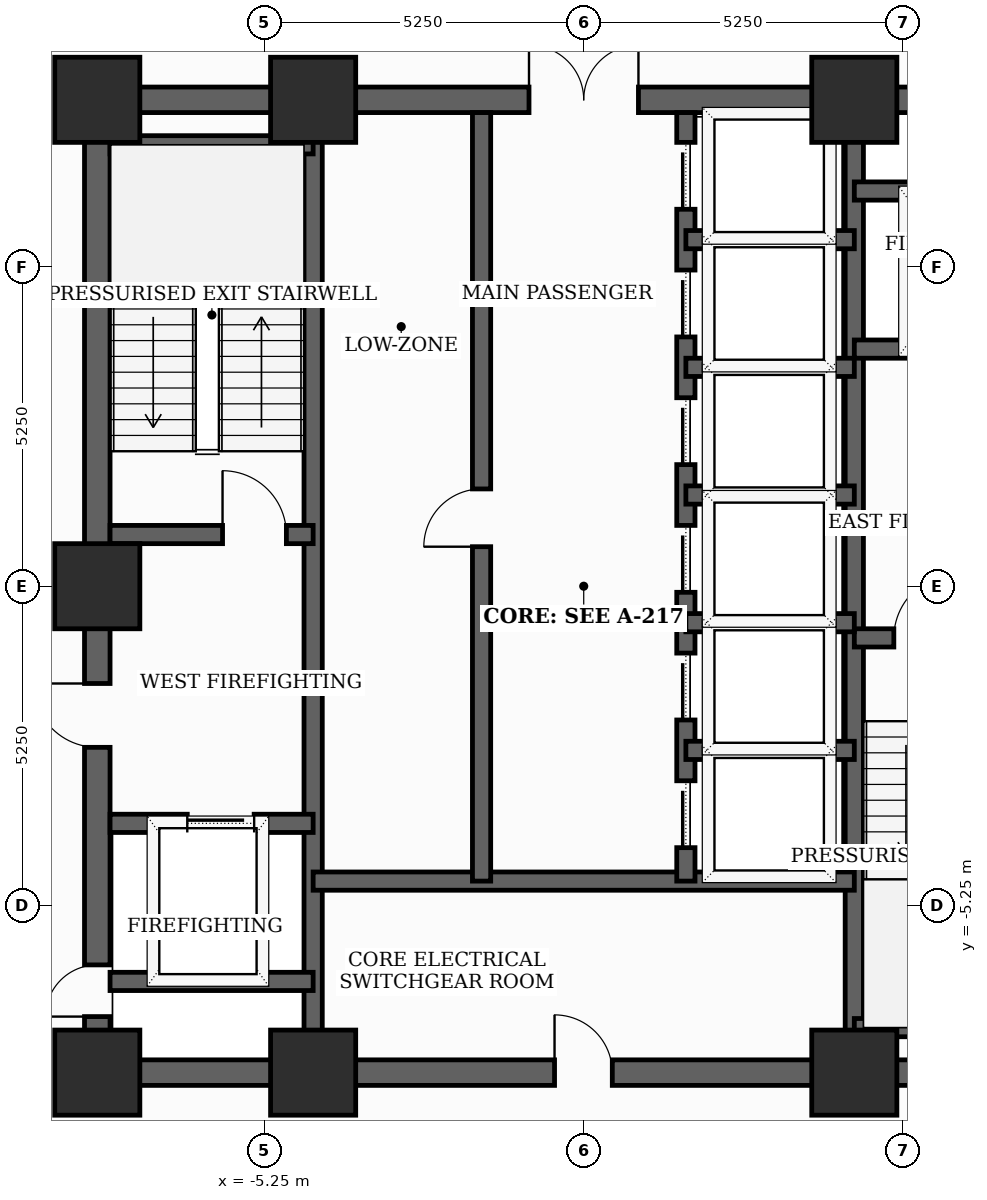
"""IFC4 building model, lengths in metres.
Left out: names, types, materials, properties, quantities, classifications, styles, units other than length and angle.
Written with IfcOpenShell. Run it as: python <this file> out.ifc"""

import sys

from ifc_helpers import new_model, si_unit, direction, frame, frame_2d, origin, origin_2d, place, context, subcontext, project, spatial, rectangle, extrude, element, fill, save


model = new_model("IFC4")
c1 = context("Model", 3, precision=1e-05, world=origin(), true_north=direction((0.0, 1.0)))
c2 = subcontext(c1, "Body", "Model", "MODEL_VIEW")
j1 = project(units=[si_unit("LENGTHUNIT", "METRE"), si_unit("PLANEANGLEUNIT", "RADIAN")], contexts=[c1])
p1 = place(None, origin())
s1 = spatial("IfcSite", under=j1, at=p1, CompositionType="ELEMENT")
p2 = place(p1, origin())
s2 = spatial("IfcBuilding", under=s1, at=p2, CompositionType="ELEMENT")
p3 = place(p2, frame((0.0, 0.0, 119.9)))
s3 = spatial("IfcBuildingStorey", under=s2, at=p3, CompositionType="ELEMENT", Elevation=119.9)
for number, where, z_axis, x_axis in (
    (1, (-8.0, -8.0, 0.0), (0.0, 0.0, 1.0), (1.0, 0.0, 0.0)),
    (2, (-4.45, -8.0, 0.0), (0.0, 0.0, 1.0), (1.0, 0.0, 0.0)),
    (3, (4.45, -8.0, 0.0), (0.0, 0.0, 1.0), (1.0, 0.0, 0.0)),
    (4, (4.45, 8.0, 0.0), (0.0, 0.0, 1.0), (1.0, 0.0, 0.0)),
    (5, (-4.45, 8.0, 0.0), (0.0, 0.0, 1.0), (1.0, 0.0, 0.0)),
    (6, (-8.0, 8.0, 0.0), (0.0, 0.0, 1.0), (1.0, 0.0, 0.0)),
    (7, (-8.0, 0.0, 0.0), (0.0, 0.0, 1.0), (1.0, 0.0, 0.0)),
):
    element("IfcColumn", number, at=place(p3, frame(where, z_axis=z_axis, x_axis=x_axis)), inside=s3, PredefinedType="COLUMN", context=c2, shape_type="SweptSolid", body=[
        extrude(rectangle(XDim=1.4, YDim=1.4, at=origin_2d()), origin(), (0.0, 0.0, 1.0), 3.7),
    ])
p4 = place(p3, frame((-8.0, -8.0, 0.0), z_axis=(0.0, 0.0, 1.0), x_axis=(0.0, 1.0, 0.0)))
e8 = element("IfcWall", 8, at=p4, inside=s3, PredefinedType="SHEAR", context=c2, shape_type="SweptSolid", body=[
    extrude(rectangle(XDim=16.0, YDim=0.42, at=frame_2d((8.0, 0.0))), origin(), (0.0, 0.0, 1.0), 3.5),
])
p5 = place(p4, frame((0.922, 0.0, 0.0)))
e9 = element("IfcOpeningElement", 9, at=p5, cuts=e8, PredefinedType="OPENING", context=c2, shape_type="SweptSolid", body=[
    extrude(rectangle(XDim=0.85, YDim=2.02, at=frame_2d((0.425, 1.01))), frame((0.0, 0.22, 0.0), z_axis=(0.0, -1.0, 0.0), x_axis=(1.0, 0.0, 0.0)), (0.0, 0.0, 1.0), 0.44),
])
p6 = place(p4, frame((5.35, 0.0, 0.0)))
e10 = element("IfcOpeningElement", 10, at=p6, cuts=e8, PredefinedType="OPENING", context=c2, shape_type="SweptSolid", body=[
    extrude(rectangle(XDim=1.05, YDim=2.15, at=frame_2d((0.525, 1.075))), frame((0.0, 0.22, 0.0), z_axis=(0.0, -1.0, 0.0), x_axis=(1.0, 0.0, 0.0)), (0.0, 0.0, 1.0), 0.44),
])
p7 = place(p3, frame((-8.0, -8.0, 0.0), z_axis=(0.0, 0.0, 1.0), x_axis=(1.0, 0.0, 0.0)))
e11 = element("IfcWall", 11, at=p7, inside=s3, PredefinedType="SHEAR", context=c2, shape_type="SweptSolid", body=[
    extrude(rectangle(XDim=16.0, YDim=0.42, at=frame_2d((8.0, 0.0))), origin(), (0.0, 0.0, 1.0), 3.5),
])
p8 = place(p7, frame((7.52, 0.0, 0.0)))
e12 = element("IfcOpeningElement", 12, at=p8, cuts=e11, PredefinedType="OPENING", context=c2, shape_type="SweptSolid", body=[
    extrude(rectangle(XDim=0.95, YDim=2.1, at=frame_2d((0.475, 1.05))), frame((0.0, 0.22, 0.0), z_axis=(0.0, -1.0, 0.0), x_axis=(1.0, 0.0, 0.0)), (0.0, 0.0, 1.0), 0.44),
])
p9 = place(p3, frame((-8.0, 8.0, 0.0), z_axis=(0.0, 0.0, 1.0), x_axis=(1.0, 0.0, 0.0)))
e13 = element("IfcWall", 13, at=p9, inside=s3, PredefinedType="SHEAR", context=c2, shape_type="SweptSolid", body=[
    extrude(rectangle(XDim=16.0, YDim=0.42, at=frame_2d((8.0, 0.0))), origin(), (0.0, 0.0, 1.0), 3.5),
])
p10 = place(p9, frame((7.1, 0.0, 0.0)))
e14 = element("IfcOpeningElement", 14, at=p10, cuts=e13, PredefinedType="OPENING", context=c2, shape_type="SweptSolid", body=[
    extrude(rectangle(XDim=1.8, YDim=2.15, at=frame_2d((0.9, 1.075))), frame((0.0, 0.22, 0.0), z_axis=(0.0, -1.0, 0.0), x_axis=(1.0, 0.0, 0.0)), (0.0, 0.0, 1.0), 0.44),
])
for number, where, z_axis, x_axis in (
    (15, (-4.45, -7.79, 0.0), (0.0, 0.0, 1.0), (0.0, 1.0, 0.0)),
    (16, (4.45, -7.79, 0.0), (0.0, 0.0, 1.0), (0.0, 1.0, 0.0)),
):
    element("IfcWall", number, at=place(p3, frame(where, z_axis=z_axis, x_axis=x_axis)), inside=s3, PredefinedType="SHEAR", context=c2, shape_type="SweptSolid", body=[
        extrude(rectangle(XDim=15.58, YDim=0.3, at=frame_2d((7.79, 0.0))), origin(), (0.0, 0.0, 1.0), 3.5),
    ])
p11 = place(p3, frame((-7.79, 0.85, 0.0), z_axis=(0.0, 0.0, 1.0), x_axis=(1.0, 0.0, 0.0)))
e17 = element("IfcWall", 17, at=p11, inside=s3, PredefinedType="SHEAR", context=c2, shape_type="SweptSolid", body=[
    extrude(rectangle(XDim=3.34, YDim=0.3, at=frame_2d((1.67, 0.0))), origin(), (0.0, 0.0, 1.0), 3.5),
])
p12 = place(p11, frame((1.85, 0.0, 0.0)))
e18 = element("IfcOpeningElement", 18, at=p12, cuts=e17, PredefinedType="OPENING", context=c2, shape_type="SweptSolid", body=[
    extrude(rectangle(XDim=1.05, YDim=2.15, at=frame_2d((0.525, 1.075))), frame((0.0, 0.16, 0.0), z_axis=(0.0, -1.0, 0.0), x_axis=(1.0, 0.0, 0.0)), (0.0, 0.0, 1.0), 0.32),
])
p13 = place(p3, frame((-7.79, 7.26, 0.0), z_axis=(0.0, 0.0, 1.0), x_axis=(1.0, 0.0, 0.0)))
e19 = element("IfcWall", 19, at=p13, inside=s3, PredefinedType="SHEAR", context=c2, shape_type="SweptSolid", body=[
    extrude(rectangle(XDim=3.34, YDim=0.3, at=frame_2d((1.67, 0.0))), origin(), (0.0, 0.0, 1.0), 3.5),
])
p14 = place(p3, frame((4.45, -0.85, 0.0), z_axis=(0.0, 0.0, 1.0), x_axis=(1.0, 0.0, 0.0)))
e20 = element("IfcWall", 20, at=p14, inside=s3, PredefinedType="SHEAR", context=c2, shape_type="SweptSolid", body=[
    extrude(rectangle(XDim=3.34, YDim=0.3, at=frame_2d((1.67, 0.0))), origin(), (0.0, 0.0, 1.0), 3.5),
])
p15 = place(p14, frame((0.65, 0.0, 0.0)))
e21 = element("IfcOpeningElement", 21, at=p15, cuts=e20, PredefinedType="OPENING", context=c2, shape_type="SweptSolid", body=[
    extrude(rectangle(XDim=1.05, YDim=2.15, at=frame_2d((0.525, 1.075))), frame((0.0, 0.16, 0.0), z_axis=(0.0, -1.0, 0.0), x_axis=(1.0, 0.0, 0.0)), (0.0, 0.0, 1.0), 0.32),
])
p16 = place(p3, frame((4.45, -7.26, 0.0), z_axis=(0.0, 0.0, 1.0), x_axis=(1.0, 0.0, 0.0)))
e22 = element("IfcWall", 22, at=p16, inside=s3, PredefinedType="SHEAR", context=c2, shape_type="SweptSolid", body=[
    extrude(rectangle(XDim=3.55, YDim=0.3, at=frame_2d((1.775, 0.0))), origin(), (0.0, 0.0, 1.0), 3.5),
])
p17 = place(p3, frame((-7.79, -3.9, 0.0), z_axis=(0.0, 0.0, 1.0), x_axis=(1.0, 0.0, 0.0)))
e23 = element("IfcWall", 23, at=p17, inside=s3, PredefinedType="SHEAR", context=c2, shape_type="SweptSolid", body=[
    extrude(rectangle(XDim=3.34, YDim=0.3, at=frame_2d((1.67, 0.0))), origin(), (0.0, 0.0, 1.0), 3.5),
])
p18 = place(p17, frame((1.27, 0.0, 0.0)))
e24 = element("IfcOpeningElement", 24, at=p18, cuts=e23, PredefinedType="OPENING", context=c2, shape_type="SweptSolid", body=[
    extrude(rectangle(XDim=1.1, YDim=2.1, at=frame_2d((0.55, 1.05))), frame((0.0, 0.16, 0.0), z_axis=(0.0, -1.0, 0.0), x_axis=(1.0, 0.0, 0.0)), (0.0, 0.0, 1.0), 0.32),
])
p19 = place(p3, frame((-7.79, -6.5, 0.0), z_axis=(0.0, 0.0, 1.0), x_axis=(1.0, 0.0, 0.0)))
e25 = element("IfcWall", 25, at=p19, inside=s3, PredefinedType="SHEAR", context=c2, shape_type="SweptSolid", body=[
    extrude(rectangle(XDim=3.34, YDim=0.3, at=frame_2d((1.67, 0.0))), origin(), (0.0, 0.0, 1.0), 3.5),
])
p20 = place(p3, frame((4.45, 3.9, 0.0), z_axis=(0.0, 0.0, 1.0), x_axis=(1.0, 0.0, 0.0)))
e26 = element("IfcWall", 26, at=p20, inside=s3, PredefinedType="SHEAR", context=c2, shape_type="SweptSolid", body=[
    extrude(rectangle(XDim=3.34, YDim=0.3, at=frame_2d((1.67, 0.0))), origin(), (0.0, 0.0, 1.0), 3.5),
])
p21 = place(p20, frame((1.18, 0.0, 0.0)))
e27 = element("IfcOpeningElement", 27, at=p21, cuts=e26, PredefinedType="OPENING", context=c2, shape_type="SweptSolid", body=[
    extrude(rectangle(XDim=1.1, YDim=2.1, at=frame_2d((0.55, 1.05))), frame((0.0, 0.16, 0.0), z_axis=(0.0, -1.0, 0.0), x_axis=(1.0, 0.0, 0.0)), (0.0, 0.0, 1.0), 0.32),
])
p22 = place(p3, frame((4.45, 6.5, 0.0), z_axis=(0.0, 0.0, 1.0), x_axis=(1.0, 0.0, 0.0)))
e28 = element("IfcWall", 28, at=p22, inside=s3, PredefinedType="SHEAR", context=c2, shape_type="SweptSolid", body=[
    extrude(rectangle(XDim=3.34, YDim=0.3, at=frame_2d((1.67, 0.0))), origin(), (0.0, 0.0, 1.0), 3.5),
])
p23 = place(p3, frame((-4.45, -4.85, 0.0), z_axis=(0.0, 0.0, 1.0), x_axis=(1.0, 0.0, 0.0)))
e29 = element("IfcWall", 29, at=p23, inside=s3, PredefinedType="SHEAR", context=c2, shape_type="SweptSolid", body=[
    extrude(rectangle(XDim=8.9, YDim=0.3, at=frame_2d((4.45, 0.0))), origin(), (0.0, 0.0, 1.0), 3.5),
])
p24 = place(p3, frame((-1.68, -4.85, 0.0), z_axis=(0.0, 0.0, 1.0), x_axis=(0.0, 1.0, 0.0)))
e30 = element("IfcWall", 30, at=p24, inside=s3, PredefinedType="SHEAR", context=c2, shape_type="SweptSolid", body=[
    extrude(rectangle(XDim=12.64, YDim=0.3, at=frame_2d((6.32, 0.0))), origin(), (0.0, 0.0, 1.0), 3.5),
])
p25 = place(p24, frame((5.5, 0.0, 0.0)))
e31 = element("IfcOpeningElement", 31, at=p25, cuts=e30, PredefinedType="OPENING", context=c2, shape_type="SweptSolid", body=[
    extrude(rectangle(XDim=0.95, YDim=2.1, at=frame_2d((0.475, 1.05))), frame((0.0, 0.16, 0.0), z_axis=(0.0, -1.0, 0.0), x_axis=(1.0, 0.0, 0.0)), (0.0, 0.0, 1.0), 0.32),
])
p26 = place(p3, frame((1.68, -4.85, 0.0), z_axis=(0.0, 0.0, 1.0), x_axis=(0.0, 1.0, 0.0)))
e32 = element("IfcWall", 32, at=p26, inside=s3, PredefinedType="SHEAR", context=c2, shape_type="SweptSolid", body=[
    extrude(rectangle(XDim=12.64, YDim=0.3, at=frame_2d((6.32, 0.0))), origin(), (0.0, 0.0, 1.0), 3.5),
])
p27 = place(p26, frame((0.55, 0.0, 0.0)))
e33 = element("IfcOpeningElement", 33, at=p27, cuts=e32, PredefinedType="OPENING", context=c2, shape_type="SweptSolid", body=[
    extrude(rectangle(XDim=1.1, YDim=2.1, at=frame_2d((0.55, 1.05))), frame((0.0, 0.16, 0.0), z_axis=(0.0, -1.0, 0.0), x_axis=(1.0, 0.0, 0.0)), (0.0, 0.0, 1.0), 0.32),
])
p28 = place(p26, frame((2.65, 0.0, 0.0)))
e34 = element("IfcOpeningElement", 34, at=p28, cuts=e32, PredefinedType="OPENING", context=c2, shape_type="SweptSolid", body=[
    extrude(rectangle(XDim=1.1, YDim=2.1, at=frame_2d((0.55, 1.05))), frame((0.0, 0.16, 0.0), z_axis=(0.0, -1.0, 0.0), x_axis=(1.0, 0.0, 0.0)), (0.0, 0.0, 1.0), 0.32),
])
p29 = place(p26, frame((4.75, 0.0, 0.0)))
e35 = element("IfcOpeningElement", 35, at=p29, cuts=e32, PredefinedType="OPENING", context=c2, shape_type="SweptSolid", body=[
    extrude(rectangle(XDim=1.1, YDim=2.1, at=frame_2d((0.55, 1.05))), frame((0.0, 0.16, 0.0), z_axis=(0.0, -1.0, 0.0), x_axis=(1.0, 0.0, 0.0)), (0.0, 0.0, 1.0), 0.32),
])
p30 = place(p26, frame((6.85, 0.0, 0.0)))
e36 = element("IfcOpeningElement", 36, at=p30, cuts=e32, PredefinedType="OPENING", context=c2, shape_type="SweptSolid", body=[
    extrude(rectangle(XDim=1.1, YDim=2.1, at=frame_2d((0.55, 1.05))), frame((0.0, 0.16, 0.0), z_axis=(0.0, -1.0, 0.0), x_axis=(1.0, 0.0, 0.0)), (0.0, 0.0, 1.0), 0.32),
])
p31 = place(p26, frame((8.95, 0.0, 0.0)))
e37 = element("IfcOpeningElement", 37, at=p31, cuts=e32, PredefinedType="OPENING", context=c2, shape_type="SweptSolid", body=[
    extrude(rectangle(XDim=1.1, YDim=2.1, at=frame_2d((0.55, 1.05))), frame((0.0, 0.16, 0.0), z_axis=(0.0, -1.0, 0.0), x_axis=(1.0, 0.0, 0.0)), (0.0, 0.0, 1.0), 0.32),
])
p32 = place(p26, frame((11.05, 0.0, 0.0)))
e38 = element("IfcOpeningElement", 38, at=p32, cuts=e32, PredefinedType="OPENING", context=c2, shape_type="SweptSolid", body=[
    extrude(rectangle(XDim=1.1, YDim=2.1, at=frame_2d((0.55, 1.05))), frame((0.0, 0.16, 0.0), z_axis=(0.0, -1.0, 0.0), x_axis=(1.0, 0.0, 0.0)), (0.0, 0.0, 1.0), 0.32),
])
for number, where, z_axis, x_axis in (
    (39, (1.68, 1.5, 0.0), (0.0, 0.0, 1.0), (1.0, 0.0, 0.0)),
    (40, (1.68, 3.6, 0.0), (0.0, 0.0, 1.0), (1.0, 0.0, 0.0)),
    (41, (1.68, 5.7, 0.0), (0.0, 0.0, 1.0), (1.0, 0.0, 0.0)),
    (42, (1.68, -2.7, 0.0), (0.0, 0.0, 1.0), (1.0, 0.0, 0.0)),
    (43, (1.68, -0.6, 0.0), (0.0, 0.0, 1.0), (1.0, 0.0, 0.0)),
):
    element("IfcWall", number, at=place(p3, frame(where, z_axis=z_axis, x_axis=x_axis)), inside=s3, PredefinedType="SHEAR", context=c2, shape_type="SweptSolid", body=[
        extrude(rectangle(XDim=2.77, YDim=0.3, at=frame_2d((1.385, 0.0))), origin(), (0.0, 0.0, 1.0), 3.5),
    ])
p33 = place(p5, origin())
e44 = element("IfcDoor", 44, at=p33, inside=s3, OperationType="SINGLE_SWING_LEFT", PredefinedType="TRAPDOOR", context=c2, shape_type="SweptSolid", body=[
    extrude(rectangle(XDim=0.85, YDim=2.02, at=frame_2d((0.425, 1.01))), frame((0.0, 0.025, 0.0), z_axis=(0.0, -1.0, 0.0), x_axis=(1.0, 0.0, 0.0)), (0.0, 0.0, 1.0), 0.05),
])
fill(e9, e44)
p34 = place(p6, origin())
e45 = element("IfcDoor", 45, at=p34, inside=s3, OperationType="SINGLE_SWING_RIGHT", PredefinedType="DOOR", context=c2, shape_type="SweptSolid", body=[
    extrude(rectangle(XDim=1.05, YDim=2.15, at=frame_2d((0.525, 1.075))), frame((0.0, 0.025, 0.0), z_axis=(0.0, -1.0, 0.0), x_axis=(1.0, 0.0, 0.0)), (0.0, 0.0, 1.0), 0.05),
])
fill(e10, e45)
p35 = place(p8, origin())
e46 = element("IfcDoor", 46, at=p35, inside=s3, OperationType="SINGLE_SWING_LEFT", PredefinedType="DOOR", context=c2, shape_type="SweptSolid", body=[
    extrude(rectangle(XDim=0.95, YDim=2.1, at=frame_2d((0.475, 1.05))), frame((0.0, 0.025, 0.0), z_axis=(0.0, -1.0, 0.0), x_axis=(1.0, 0.0, 0.0)), (0.0, 0.0, 1.0), 0.05),
])
fill(e12, e46)
p36 = place(p10, origin())
e47 = element("IfcDoor", 47, at=p36, inside=s3, OperationType="DOUBLE_DOOR_SINGLE_SWING", PredefinedType="DOOR", context=c2, shape_type="SweptSolid", body=[
    extrude(rectangle(XDim=1.8, YDim=2.15, at=frame_2d((0.9, 1.075))), frame((0.0, 0.025, 0.0), z_axis=(0.0, -1.0, 0.0), x_axis=(1.0, 0.0, 0.0)), (0.0, 0.0, 1.0), 0.05),
])
fill(e14, e47)
p37 = place(p12, origin())
e48 = element("IfcDoor", 48, at=p37, inside=s3, OperationType="SINGLE_SWING_LEFT", PredefinedType="DOOR", context=c2, shape_type="SweptSolid", body=[
    extrude(rectangle(XDim=1.05, YDim=2.15, at=frame_2d((0.525, 1.075))), frame((0.0, 0.025, 0.0), z_axis=(0.0, -1.0, 0.0), x_axis=(1.0, 0.0, 0.0)), (0.0, 0.0, 1.0), 0.05),
])
fill(e18, e48)
p38 = place(p15, origin())
e49 = element("IfcDoor", 49, at=p38, inside=s3, OperationType="SINGLE_SWING_RIGHT", PredefinedType="DOOR", context=c2, shape_type="SweptSolid", body=[
    extrude(rectangle(XDim=1.05, YDim=2.15, at=frame_2d((0.525, 1.075))), frame((0.0, 0.025, 0.0), z_axis=(0.0, -1.0, 0.0), x_axis=(1.0, 0.0, 0.0)), (0.0, 0.0, 1.0), 0.05),
])
fill(e21, e49)
p39 = place(p18, origin())
e50 = element("IfcDoor", 50, at=p39, inside=s3, OperationType="SLIDING_TO_LEFT", PredefinedType="DOOR", context=c2, shape_type="SweptSolid", body=[
    extrude(rectangle(XDim=1.1, YDim=2.1, at=frame_2d((0.55, 1.05))), frame((0.0, 0.025, 0.0), z_axis=(0.0, -1.0, 0.0), x_axis=(1.0, 0.0, 0.0)), (0.0, 0.0, 1.0), 0.05),
])
fill(e24, e50)
p40 = place(p25, origin())
e51 = element("IfcDoor", 51, at=p40, inside=s3, OperationType="SINGLE_SWING_LEFT", PredefinedType="DOOR", context=c2, shape_type="SweptSolid", body=[
    extrude(rectangle(XDim=0.95, YDim=2.1, at=frame_2d((0.475, 1.05))), frame((0.0, 0.025, 0.0), z_axis=(0.0, -1.0, 0.0), x_axis=(1.0, 0.0, 0.0)), (0.0, 0.0, 1.0), 0.05),
])
fill(e31, e51)
p41 = place(p27, origin())
e52 = element("IfcDoor", 52, at=p41, inside=s3, OperationType="SLIDING_TO_LEFT", PredefinedType="DOOR", context=c2, shape_type="SweptSolid", body=[
    extrude(rectangle(XDim=1.1, YDim=2.1, at=frame_2d((0.55, 1.05))), frame((0.0, 0.025, 0.0), z_axis=(0.0, -1.0, 0.0), x_axis=(1.0, 0.0, 0.0)), (0.0, 0.0, 1.0), 0.05),
])
fill(e33, e52)
p42 = place(p28, origin())
e53 = element("IfcDoor", 53, at=p42, inside=s3, OperationType="SLIDING_TO_LEFT", PredefinedType="DOOR", context=c2, shape_type="SweptSolid", body=[
    extrude(rectangle(XDim=1.1, YDim=2.1, at=frame_2d((0.55, 1.05))), frame((0.0, 0.025, 0.0), z_axis=(0.0, -1.0, 0.0), x_axis=(1.0, 0.0, 0.0)), (0.0, 0.0, 1.0), 0.05),
])
fill(e34, e53)
p43 = place(p29, origin())
e54 = element("IfcDoor", 54, at=p43, inside=s3, OperationType="SLIDING_TO_LEFT", PredefinedType="DOOR", context=c2, shape_type="SweptSolid", body=[
    extrude(rectangle(XDim=1.1, YDim=2.1, at=frame_2d((0.55, 1.05))), frame((0.0, 0.025, 0.0), z_axis=(0.0, -1.0, 0.0), x_axis=(1.0, 0.0, 0.0)), (0.0, 0.0, 1.0), 0.05),
])
fill(e35, e54)
p44 = place(p30, origin())
e55 = element("IfcDoor", 55, at=p44, inside=s3, OperationType="SLIDING_TO_LEFT", PredefinedType="DOOR", context=c2, shape_type="SweptSolid", body=[
    extrude(rectangle(XDim=1.1, YDim=2.1, at=frame_2d((0.55, 1.05))), frame((0.0, 0.025, 0.0), z_axis=(0.0, -1.0, 0.0), x_axis=(1.0, 0.0, 0.0)), (0.0, 0.0, 1.0), 0.05),
])
fill(e36, e55)
p45 = place(p31, origin())
e56 = element("IfcDoor", 56, at=p45, inside=s3, OperationType="SLIDING_TO_LEFT", PredefinedType="DOOR", context=c2, shape_type="SweptSolid", body=[
    extrude(rectangle(XDim=1.1, YDim=2.1, at=frame_2d((0.55, 1.05))), frame((0.0, 0.025, 0.0), z_axis=(0.0, -1.0, 0.0), x_axis=(1.0, 0.0, 0.0)), (0.0, 0.0, 1.0), 0.05),
])
fill(e37, e56)
p46 = place(p32, origin())
e57 = element("IfcDoor", 57, at=p46, inside=s3, OperationType="SLIDING_TO_LEFT", PredefinedType="DOOR", context=c2, shape_type="SweptSolid", body=[
    extrude(rectangle(XDim=1.1, YDim=2.1, at=frame_2d((0.55, 1.05))), frame((0.0, 0.025, 0.0), z_axis=(0.0, -1.0, 0.0), x_axis=(1.0, 0.0, 0.0)), (0.0, 0.0, 1.0), 0.05),
])
fill(e38, e57)
save(model, sys.argv[1])
